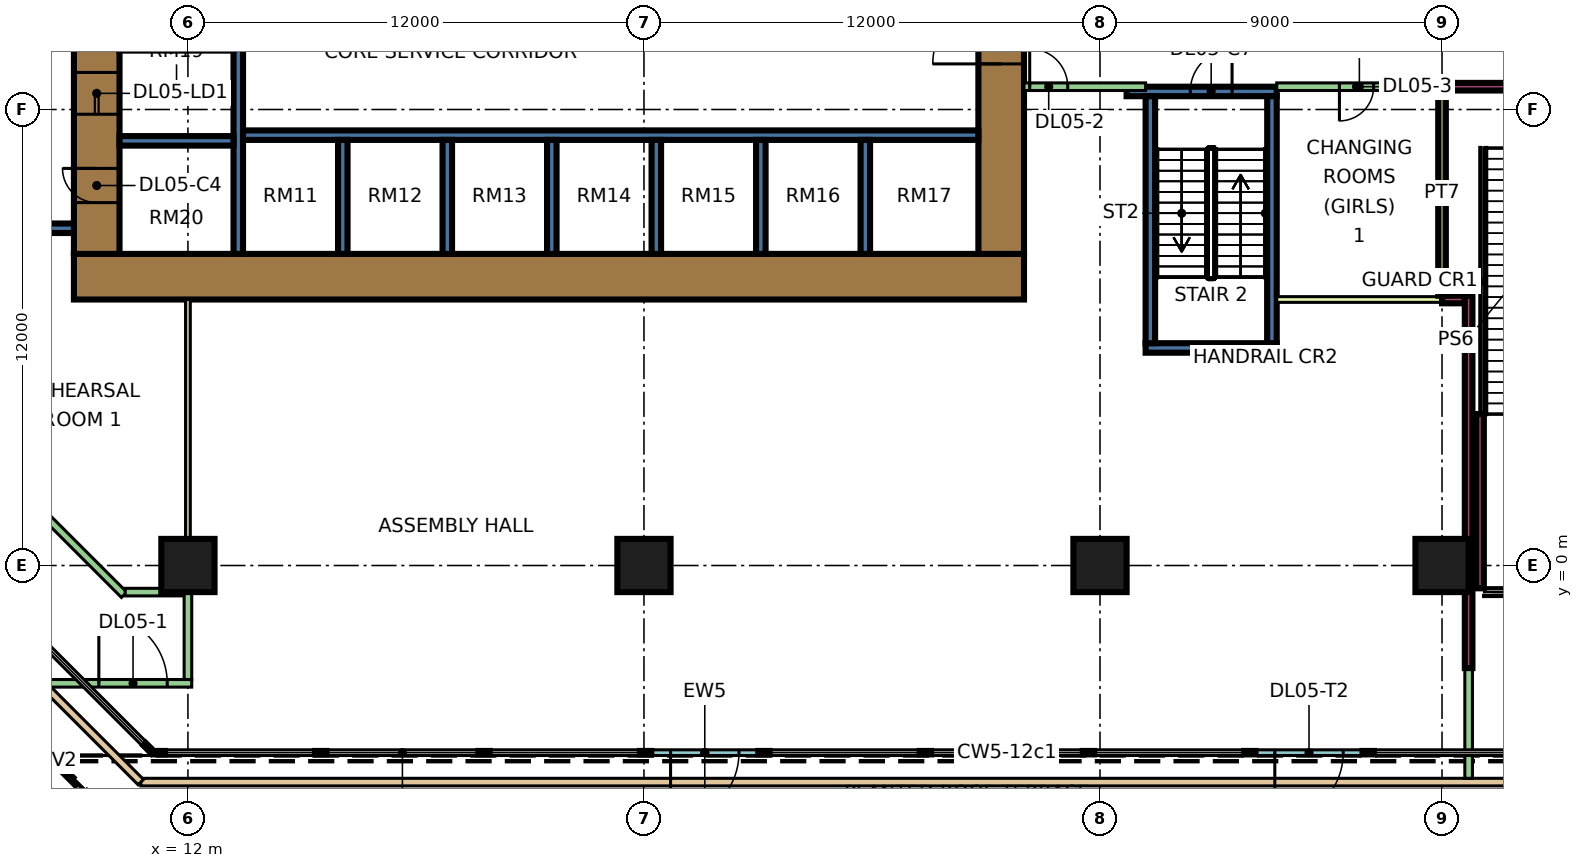
"""IFC4 building model, lengths in metres.
Left out: names, types, materials, properties, quantities, classifications, styles, units other than length and angle.
Written with IfcOpenShell. Run it as: python <this file> out.ifc"""

import sys

from ifc_helpers import new_model, si_unit, direction, frame, frame_2d, origin, origin_2d, place, context, subcontext, project, spatial, rectangle, extrude, element, fill, save


model = new_model("IFC4")
c1 = context("Model", 3, precision=1e-05, world=origin(), true_north=direction((0.0, 1.0)))
c2 = subcontext(c1, "Body", "Model", "MODEL_VIEW")
j1 = project(units=[si_unit("LENGTHUNIT", "METRE"), si_unit("PLANEANGLEUNIT", "RADIAN")], contexts=[c1])
p1 = place(None, origin())
s1 = spatial("IfcSite", under=j1, at=p1, CompositionType="ELEMENT")
p2 = place(p1, origin())
s2 = spatial("IfcBuilding", under=s1, at=p2, CompositionType="ELEMENT")
p3 = place(p2, frame((0.0, 0.0, 26.4)))
s3 = spatial("IfcBuildingStorey", under=s2, at=p3, CompositionType="ELEMENT", Elevation=26.4)
for number, where, z_axis, x_axis in (
    (1, (12.0, 0.0, 0.0), (0.0, 0.0, 1.0), (1.0, 0.0, 0.0)),
    (2, (24.0, 0.0, 0.0), (0.0, 0.0, 1.0), (1.0, 0.0, 0.0)),
    (3, (36.0, 0.0, 0.0), (0.0, 0.0, 1.0), (1.0, 0.0, 0.0)),
    (4, (45.0, 0.0, 0.0), (0.0, 0.0, 1.0), (1.0, 0.0, 0.0)),
):
    element("IfcColumn", number, at=place(p3, frame(where, z_axis=z_axis, x_axis=x_axis)), inside=s3, PredefinedType="COLUMN", context=c2, shape_type="SweptSolid", body=[
        extrude(rectangle(XDim=1.4, YDim=1.4, at=origin_2d()), origin(), (0.0, 0.0, 1.0), 9.0),
    ])
p4 = place(p3, frame((9.0, 7.6, 0.0), z_axis=(0.0, 0.0, 1.0), x_axis=(1.0, 0.0, 0.0)))
e5 = element("IfcWall", 5, at=p4, inside=s3, PredefinedType="SHEAR", context=c2, shape_type="SweptSolid", body=[
    extrude(rectangle(XDim=25.0, YDim=1.2, at=frame_2d((12.5, 0.0))), origin(), (0.0, 0.0, 1.0), 9.0),
])
p5 = place(p3, frame((9.6, 8.2, 0.0), z_axis=(0.0, 0.0, 1.0), x_axis=(0.0, 1.0, 0.0)))
e6 = element("IfcWall", 6, at=p5, inside=s3, PredefinedType="SHEAR", context=c2, shape_type="SweptSolid", body=[
    extrude(rectangle(XDim=10.6, YDim=1.2, at=frame_2d((5.3, 0.0))), origin(), (0.0, 0.0, 1.0), 9.0),
])
p6 = place(p5, frame((3.675, 0.0, 0.0)))
e7 = element("IfcOpeningElement", 7, at=p6, cuts=e6, PredefinedType="OPENING", context=c2, shape_type="SweptSolid", body=[
    extrude(rectangle(XDim=1.1, YDim=2.2, at=frame_2d((0.55, 1.1))), frame((0.0, 0.61, 0.0), z_axis=(0.0, -1.0, 0.0), x_axis=(1.0, 0.0, 0.0)), (0.0, 0.0, 1.0), 1.22),
])
p7 = place(p5, frame((6.175, 0.0, 0.0)))
e8 = element("IfcOpeningElement", 8, at=p7, cuts=e6, PredefinedType="OPENING", context=c2, shape_type="SweptSolid", body=[
    extrude(rectangle(XDim=1.1, YDim=2.2, at=frame_2d((0.55, 1.1))), frame((0.0, 0.61, 0.0), z_axis=(0.0, -1.0, 0.0), x_axis=(1.0, 0.0, 0.0)), (0.0, 0.0, 1.0), 1.22),
])
p8 = place(p5, frame((8.8, 0.0, 0.0)))
e9 = element("IfcOpeningElement", 9, at=p8, cuts=e6, PredefinedType="OPENING", context=c2, shape_type="SweptSolid", body=[
    extrude(rectangle(XDim=1.1, YDim=2.2, at=frame_2d((0.55, 1.1))), frame((0.0, 0.61, 0.0), z_axis=(0.0, -1.0, 0.0), x_axis=(1.0, 0.0, 0.0)), (0.0, 0.0, 1.0), 1.22),
])
p9 = place(p5, frame((1.35, 0.0, 0.0)))
e10 = element("IfcOpeningElement", 10, at=p9, cuts=e6, PredefinedType="OPENING", context=c2, shape_type="SweptSolid", body=[
    extrude(rectangle(XDim=0.9, YDim=2.1, at=frame_2d((0.45, 1.05))), frame((0.0, 0.61, 0.0), z_axis=(0.0, -1.0, 0.0), x_axis=(1.0, 0.0, 0.0)), (0.0, 0.0, 1.0), 1.22),
])
p10 = place(p3, frame((33.4, 8.2, 0.0), z_axis=(0.0, 0.0, 1.0), x_axis=(0.0, 1.0, 0.0)))
e11 = element("IfcWall", 11, at=p10, inside=s3, PredefinedType="SHEAR", context=c2, shape_type="SweptSolid", body=[
    extrude(rectangle(XDim=10.6, YDim=1.2, at=frame_2d((5.3, 0.0))), origin(), (0.0, 0.0, 1.0), 9.0),
])
p11 = place(p10, frame((5.0, 0.0, 0.0)))
e12 = element("IfcOpeningElement", 12, at=p11, cuts=e11, PredefinedType="OPENING", context=c2, shape_type="SweptSolid", body=[
    extrude(rectangle(XDim=1.8, YDim=2.4, at=frame_2d((0.9, 1.2))), frame((0.0, 0.61, 0.0), z_axis=(0.0, -1.0, 0.0), x_axis=(1.0, 0.0, 0.0)), (0.0, 0.0, 1.0), 1.22),
])
p12 = place(p3, frame((13.325, 8.2, 0.0), z_axis=(0.0, 0.0, 1.0), x_axis=(0.0, 1.0, 0.0)))
e13 = element("IfcWall", 13, at=p12, inside=s3, PredefinedType="SHEAR", context=c2, shape_type="SweptSolid", body=[
    extrude(rectangle(XDim=10.6, YDim=0.25, at=frame_2d((5.3, 0.0))), origin(), (0.0, 0.0, 1.0), 9.0),
])
p13 = place(p3, frame((13.45, 11.325, 0.0), z_axis=(0.0, 0.0, 1.0), x_axis=(1.0, 0.0, 0.0)))
e14 = element("IfcWall", 14, at=p13, inside=s3, PredefinedType="SHEAR", context=c2, shape_type="SweptSolid", body=[
    extrude(rectangle(XDim=19.35, YDim=0.25, at=frame_2d((9.675, 0.0))), origin(), (0.0, 0.0, 1.0), 9.0),
])
for number, where, z_axis, x_axis in (
    (15, (10.2, 11.175, 0.0), (0.0, 0.0, 1.0), (1.0, 0.0, 0.0)),
    (16, (16.075, 8.2, 0.0), (0.0, 0.0, 1.0), (0.0, 1.0, 0.0)),
    (17, (18.825, 8.2, 0.0), (0.0, 0.0, 1.0), (0.0, 1.0, 0.0)),
    (18, (21.575, 8.2, 0.0), (0.0, 0.0, 1.0), (0.0, 1.0, 0.0)),
    (19, (24.325, 8.2, 0.0), (0.0, 0.0, 1.0), (0.0, 1.0, 0.0)),
    (20, (27.075, 8.2, 0.0), (0.0, 0.0, 1.0), (0.0, 1.0, 0.0)),
    (21, (29.825, 8.2, 0.0), (0.0, 0.0, 1.0), (0.0, 1.0, 0.0)),
):
    element("IfcWall", number, at=place(p3, frame(where, z_axis=z_axis, x_axis=x_axis)), inside=s3, PredefinedType="SHEAR", context=c2, shape_type="SweptSolid", body=[
        extrude(rectangle(XDim=3.0, YDim=0.25, at=frame_2d((1.5, 0.0))), origin(), (0.0, 0.0, 1.0), 9.0),
    ])
p14 = place(p3, frame((5.3, 8.875, 0.0), z_axis=(0.0, 0.0, 1.0), x_axis=(1.0, 0.0, 0.0)))
e22 = element("IfcWall", 22, at=p14, inside=s3, PredefinedType="SHEAR", context=c2, shape_type="SweptSolid", body=[
    extrude(rectangle(XDim=3.7, YDim=0.25, at=frame_2d((1.85, 0.0))), origin(), (0.0, 0.0, 1.0), 9.0),
])
p15 = place(p3, frame((37.2, 5.725, 0.0), z_axis=(0.0, 0.0, 1.0), x_axis=(1.0, 0.0, 0.0)))
e23 = element("IfcWall", 23, at=p15, inside=s3, PredefinedType="SHEAR", context=c2, shape_type="SweptSolid", body=[
    extrude(rectangle(XDim=3.45, YDim=0.25, at=frame_2d((1.725, 0.0))), origin(), (0.0, 0.0, 1.0), 9.0),
])
p16 = place(p3, frame((36.7, 12.475, 0.0), z_axis=(0.0, 0.0, 1.0), x_axis=(1.0, 0.0, 0.0)))
e24 = element("IfcWall", 24, at=p16, inside=s3, PredefinedType="SHEAR", context=c2, shape_type="SweptSolid", body=[
    extrude(rectangle(XDim=3.95, YDim=0.25, at=frame_2d((1.975, 0.0))), origin(), (0.0, 0.0, 1.0), 9.0),
])
p17 = place(p16, frame((1.675, 0.0, 0.0)))
e25 = element("IfcOpeningElement", 25, at=p17, cuts=e24, PredefinedType="OPENING", context=c2, shape_type="SweptSolid", body=[
    extrude(rectangle(XDim=1.1, YDim=2.2, at=frame_2d((0.55, 1.1))), frame((0.0, 0.135, 0.0), z_axis=(0.0, -1.0, 0.0), x_axis=(1.0, 0.0, 0.0)), (0.0, 0.0, 1.0), 0.27),
])
for number, where, z_axis, x_axis in (
    (26, (37.325, 5.85, 0.0), (0.0, 0.0, 1.0), (0.0, 1.0, 0.0)),
    (27, (40.525, 5.85, 0.0), (0.0, 0.0, 1.0), (0.0, 1.0, 0.0)),
):
    element("IfcWall", number, at=place(p3, frame(where, z_axis=z_axis, x_axis=x_axis)), inside=s3, PredefinedType="SHEAR", context=c2, shape_type="SweptSolid", body=[
        extrude(rectangle(XDim=6.5, YDim=0.25, at=frame_2d((3.25, 0.0))), origin(), (0.0, 0.0, 1.0), 9.0),
    ])
p18 = place(p3, frame((24.1, -4.925, 0.0), z_axis=(0.0, 0.0, 1.0), x_axis=(1.0, 0.0, 0.0)))
e28 = element("IfcWall", 28, at=p18, inside=s3, PredefinedType="SOLIDWALL", context=c2, shape_type="SweptSolid", body=[
    extrude(rectangle(XDim=3.0, YDim=0.15, at=frame_2d((1.5, 0.0))), origin(), (0.0, 0.0, 1.0), 8.45),
])
p19 = place(p18, frame((0.6, 0.0, 0.0)))
e29 = element("IfcOpeningElement", 29, at=p19, cuts=e28, PredefinedType="OPENING", context=c2, shape_type="SweptSolid", body=[
    extrude(rectangle(XDim=1.8, YDim=2.4, at=frame_2d((0.9, 1.2))), frame((0.0, 0.085, 0.0), z_axis=(0.0, -1.0, 0.0), x_axis=(1.0, 0.0, 0.0)), (0.0, 0.0, 1.0), 0.17),
])
p20 = place(p3, frame((40.0, -4.925, 0.0), z_axis=(0.0, 0.0, 1.0), x_axis=(1.0, 0.0, 0.0)))
e30 = element("IfcWall", 30, at=p20, inside=s3, PredefinedType="SOLIDWALL", context=c2, shape_type="SweptSolid", body=[
    extrude(rectangle(XDim=3.0, YDim=0.15, at=frame_2d((1.5, 0.0))), origin(), (0.0, 0.0, 1.0), 8.45),
])
p21 = place(p20, frame((0.6, 0.0, 0.0)))
e31 = element("IfcOpeningElement", 31, at=p21, cuts=e30, PredefinedType="OPENING", context=c2, shape_type="SweptSolid", body=[
    extrude(rectangle(XDim=1.8, YDim=2.4, at=frame_2d((0.9, 1.2))), frame((0.0, 0.085, 0.0), z_axis=(0.0, -1.0, 0.0), x_axis=(1.0, 0.0, 0.0)), (0.0, 0.0, 1.0), 0.17),
])
p22 = place(p3, frame((72.24, -5.7, 0.0), z_axis=(0.0, 0.0, 1.0), x_axis=(-1.0, 0.0, 0.0)))
e32 = element("IfcWall", 32, at=p22, inside=s3, PredefinedType="PARAPET", context=c2, shape_type="SweptSolid", body=[
    extrude(rectangle(XDim=61.479, YDim=0.2, at=frame_2d((30.74, 0.0))), origin(), (0.0, 0.0, 1.0), 0.5),
])
p23 = place(p3, frame((10.76, -5.7, 0.0), z_axis=(0.0, 0.0, 1.0), x_axis=(-0.707106781187, 0.707106781187, 0.0)))
e33 = element("IfcWall", 33, at=p23, inside=s3, PredefinedType="PARAPET", context=c2, shape_type="SweptSolid", body=[
    extrude(rectangle(XDim=23.278, YDim=0.2, at=frame_2d((11.639, 0.0))), origin(), (0.0, 0.0, 1.0), 0.5),
])
p24 = place(p3, frame((-0.629, 10.179, 0.0), z_axis=(0.0, 0.0, 1.0), x_axis=(0.707106781187, -0.707106781187, 0.0)))
e34 = element("IfcWall", 34, at=p24, inside=s3, PredefinedType="PARTITIONING", context=c2, shape_type="SweptSolid", body=[
    extrude(rectangle(XDim=15.486, YDim=0.2, at=frame_2d((7.743, 0.0))), origin(), (0.0, 0.0, 1.0), 8.45),
])
p25 = place(p24, frame((9.235, 0.0, 0.0)))
e35 = element("IfcOpeningElement", 35, at=p25, cuts=e34, PredefinedType="OPENING", context=c2, shape_type="SweptSolid", body=[
    extrude(rectangle(XDim=1.0, YDim=2.1, at=frame_2d((0.5, 1.05))), frame((0.0, 0.11, 0.0), z_axis=(0.0, -1.0, 0.0), x_axis=(1.0, 0.0, 0.0)), (0.0, 0.0, 1.0), 0.22),
])
p26 = place(p3, frame((8.302, -3.1, 0.0), z_axis=(0.0, 0.0, 1.0), x_axis=(1.0, 0.0, 0.0)))
e36 = element("IfcWall", 36, at=p26, inside=s3, PredefinedType="PARTITIONING", context=c2, shape_type="SweptSolid", body=[
    extrude(rectangle(XDim=3.798, YDim=0.2, at=frame_2d((1.899, 0.0))), origin(), (0.0, 0.0, 1.0), 8.45),
])
p27 = place(p26, frame((1.354, 0.0, 0.0)))
e37 = element("IfcOpeningElement", 37, at=p27, cuts=e36, PredefinedType="OPENING", context=c2, shape_type="SweptSolid", body=[
    extrude(rectangle(XDim=1.8, YDim=2.1, at=frame_2d((0.9, 1.05))), frame((0.0, 0.11, 0.0), z_axis=(0.0, -1.0, 0.0), x_axis=(1.0, 0.0, 0.0)), (0.0, 0.0, 1.0), 0.22),
])
p28 = place(p3, frame((10.35, -0.7, 0.0), z_axis=(0.0, 0.0, 1.0), x_axis=(1.0, 0.0, 0.0)))
e38 = element("IfcWall", 38, at=p28, inside=s3, PredefinedType="PARTITIONING", context=c2, shape_type="SweptSolid", body=[
    extrude(rectangle(XDim=1.55, YDim=0.2, at=frame_2d((0.775, 0.0))), origin(), (0.0, 0.0, 1.0), 8.45),
])
p29 = place(p3, frame((12.0, -3.0, 0.0), z_axis=(0.0, 0.0, 1.0), x_axis=(0.0, 1.0, 0.0)))
e39 = element("IfcWall", 39, at=p29, inside=s3, PredefinedType="PARTITIONING", context=c2, shape_type="SweptSolid", body=[
    extrude(rectangle(XDim=2.3, YDim=0.2, at=frame_2d((1.15, 0.0))), origin(), (0.0, 0.0, 1.0), 8.45),
])
p30 = place(p3, frame((12.0, -0.7, 0.0), z_axis=(0.0, 0.0, 1.0), x_axis=(0.0, 1.0, 0.0)))
e40 = element("IfcWall", 40, at=p30, inside=s3, PredefinedType="PARTITIONING", context=c2, shape_type="SweptSolid", body=[
    extrude(rectangle(XDim=7.7, YDim=0.125, at=frame_2d((3.85, 0.0))), origin(), (0.0, 0.0, 1.0), 8.45),
])
p31 = place(p3, frame((34.0, 12.6, 0.0), z_axis=(0.0, 0.0, 1.0), x_axis=(1.0, 0.0, 0.0)))
e41 = element("IfcWall", 41, at=p31, inside=s3, PredefinedType="PARTITIONING", context=c2, shape_type="SweptSolid", body=[
    extrude(rectangle(XDim=3.2, YDim=0.2, at=frame_2d((1.6, 0.0))), origin(), (0.0, 0.0, 1.0), 8.45),
])
p32 = place(p31, frame((0.15, 0.0, 0.0)))
e42 = element("IfcOpeningElement", 42, at=p32, cuts=e41, PredefinedType="OPENING", context=c2, shape_type="SweptSolid", body=[
    extrude(rectangle(XDim=1.0, YDim=2.1, at=frame_2d((0.5, 1.05))), frame((0.0, 0.11, 0.0), z_axis=(0.0, -1.0, 0.0), x_axis=(1.0, 0.0, 0.0)), (0.0, 0.0, 1.0), 0.22),
])
p33 = place(p3, frame((40.65, 7.0, 0.0), z_axis=(0.0, 0.0, 1.0), x_axis=(1.0, 0.0, 0.0)))
e43 = element("IfcWall", 43, at=p33, inside=s3, PredefinedType="PARTITIONING", context=c2, shape_type="SweptSolid", body=[
    extrude(rectangle(XDim=4.35, YDim=0.15, at=frame_2d((2.175, 0.0))), origin(), (0.0, 0.0, 1.0), 8.45),
])
p34 = place(p3, frame((40.65, 12.6, 0.0), z_axis=(0.0, 0.0, 1.0), x_axis=(1.0, 0.0, 0.0)))
e44 = element("IfcWall", 44, at=p34, inside=s3, PredefinedType="PARTITIONING", context=c2, shape_type="SweptSolid", body=[
    extrude(rectangle(XDim=4.35, YDim=0.2, at=frame_2d((2.175, 0.0))), origin(), (0.0, 0.0, 1.0), 8.45),
])
p35 = place(p34, frame((1.65, 0.0, 0.0)))
e45 = element("IfcOpeningElement", 45, at=p35, cuts=e44, PredefinedType="OPENING", context=c2, shape_type="SweptSolid", body=[
    extrude(rectangle(XDim=0.9, YDim=2.1, at=frame_2d((0.45, 1.05))), frame((0.0, 0.11, 0.0), z_axis=(0.0, -1.0, 0.0), x_axis=(1.0, 0.0, 0.0)), (0.0, 0.0, 1.0), 0.22),
])
p36 = place(p3, frame((45.0, 7.0, 0.0), z_axis=(0.0, 0.0, 1.0), x_axis=(1.0, 0.0, 0.0)))
e46 = element("IfcWall", 46, at=p36, inside=s3, PredefinedType="SOLIDWALL", context=c2, shape_type="SweptSolid", body=[
    extrude(rectangle(XDim=0.6, YDim=0.2, at=frame_2d((0.3, 0.0))), origin(), (0.0, 0.0, 1.0), 8.45),
])
p37 = place(p3, frame((45.0, 7.1, 0.0), z_axis=(0.0, 0.0, 1.0), x_axis=(0.0, 1.0, 0.0)))
e47 = element("IfcWall", 47, at=p37, inside=s3, PredefinedType="SOLIDWALL", context=c2, shape_type="SweptSolid", body=[
    extrude(rectangle(XDim=5.4, YDim=0.2, at=frame_2d((2.7, 0.0))), origin(), (0.0, 0.0, 1.0), 6.55),
])
p38 = place(p3, frame((45.0, 12.6, 0.0), z_axis=(0.0, 0.0, 1.0), x_axis=(1.0, 0.0, 0.0)))
e48 = element("IfcWall", 48, at=p38, inside=s3, PredefinedType="SOLIDWALL", context=c2, shape_type="SweptSolid", body=[
    extrude(rectangle(XDim=8.9, YDim=0.2, at=frame_2d((4.45, 0.0))), origin(), (0.0, 0.0, 1.0), 8.45),
])
p39 = place(p38, frame((5.75, 0.0, 0.0)))
e49 = element("IfcOpeningElement", 49, at=p39, cuts=e48, PredefinedType="OPENING", context=c2, shape_type="SweptSolid", body=[
    extrude(rectangle(XDim=1.2, YDim=2.1, at=frame_2d((0.6, 1.05))), frame((0.0, 0.11, 0.0), z_axis=(0.0, -1.0, 0.0), x_axis=(1.0, 0.0, 0.0)), (0.0, 0.0, 1.0), 0.22),
])
p40 = place(p38, frame((2.15, 0.0, 0.0)))
e50 = element("IfcOpeningElement", 50, at=p40, cuts=e48, PredefinedType="OPENING", context=c2, shape_type="SweptSolid", body=[
    extrude(rectangle(XDim=1.2, YDim=2.1, at=frame_2d((0.6, 1.05))), frame((0.0, 0.11, 0.0), z_axis=(0.0, -1.0, 0.0), x_axis=(1.0, 0.0, 0.0)), (0.0, 0.0, 1.0), 0.22),
])
p41 = place(p3, frame((45.7, -5.6, 0.0), z_axis=(0.0, 0.0, 1.0), x_axis=(0.0, 1.0, 0.0)))
e51 = element("IfcWall", 51, at=p41, inside=s3, PredefinedType="PARTITIONING", context=c2, shape_type="SweptSolid", body=[
    extrude(rectangle(XDim=2.9, YDim=0.2, at=frame_2d((1.45, 0.0))), origin(), (0.0, 0.0, 1.0), 8.45),
])
p42 = place(p3, frame((45.7, -2.7, 0.0), z_axis=(0.0, 0.0, 1.0), x_axis=(0.0, 1.0, 0.0)))
e52 = element("IfcWall", 52, at=p42, inside=s3, PredefinedType="SOLIDWALL", context=c2, shape_type="SweptSolid", body=[
    extrude(rectangle(XDim=9.8, YDim=0.2, at=frame_2d((4.9, 0.0))), origin(), (0.0, 0.0, 1.0), 8.45),
])
p43 = place(p3, frame((46.0, -0.6, 0.0), z_axis=(0.0, 0.0, 1.0), x_axis=(0.0, 1.0, 0.0)))
e53 = element("IfcWall", 53, at=p43, inside=s3, PredefinedType="SOLIDWALL", context=c2, shape_type="SweptSolid", body=[
    extrude(rectangle(XDim=4.585, YDim=0.2, at=frame_2d((2.292, 0.0))), origin(), (0.0, 0.0, 1.0), 8.45),
])
p44 = place(p19, frame((1.8, 0.0, 0.0), z_axis=(0.0, 0.0, 1.0), x_axis=(-1.0, 0.0, 0.0)))
e54 = element("IfcDoor", 54, at=p44, inside=s3, OperationType="DOUBLE_DOOR_SINGLE_SWING", PredefinedType="DOOR", context=c2, shape_type="SweptSolid", body=[
    extrude(rectangle(XDim=1.8, YDim=2.4, at=frame_2d((0.9, 1.2))), frame((0.0, 0.025, 0.0), z_axis=(0.0, -1.0, 0.0), x_axis=(1.0, 0.0, 0.0)), (0.0, 0.0, 1.0), 0.05),
])
fill(e29, e54)
p45 = place(p21, frame((1.8, 0.0, 0.0), z_axis=(0.0, 0.0, 1.0), x_axis=(-1.0, 0.0, 0.0)))
e55 = element("IfcDoor", 55, at=p45, inside=s3, OperationType="DOUBLE_DOOR_SINGLE_SWING", PredefinedType="DOOR", context=c2, shape_type="SweptSolid", body=[
    extrude(rectangle(XDim=1.8, YDim=2.4, at=frame_2d((0.9, 1.2))), frame((0.0, 0.025, 0.0), z_axis=(0.0, -1.0, 0.0), x_axis=(1.0, 0.0, 0.0)), (0.0, 0.0, 1.0), 0.05),
])
fill(e31, e55)
p46 = place(p6, origin())
e56 = element("IfcDoor", 56, at=p46, inside=s3, OperationType="DOUBLE_DOOR_SLIDING", PredefinedType="DOOR", context=c2, shape_type="SweptSolid", body=[
    extrude(rectangle(XDim=1.1, YDim=2.2, at=frame_2d((0.55, 1.1))), frame((0.0, 0.025, 0.0), z_axis=(0.0, -1.0, 0.0), x_axis=(1.0, 0.0, 0.0)), (0.0, 0.0, 1.0), 0.05),
])
fill(e7, e56)
p47 = place(p11, origin())
e57 = element("IfcDoor", 57, at=p47, inside=s3, OperationType="DOUBLE_DOOR_SINGLE_SWING", PredefinedType="DOOR", context=c2, shape_type="SweptSolid", body=[
    extrude(rectangle(XDim=1.8, YDim=2.4, at=frame_2d((0.9, 1.2))), frame((0.0, 0.025, 0.0), z_axis=(0.0, -1.0, 0.0), x_axis=(1.0, 0.0, 0.0)), (0.0, 0.0, 1.0), 0.05),
])
fill(e12, e57)
p48 = place(p9, frame((0.9, 0.0, 0.0), z_axis=(0.0, 0.0, 1.0), x_axis=(-1.0, 0.0, 0.0)))
e58 = element("IfcDoor", 58, at=p48, inside=s3, OperationType="SINGLE_SWING_RIGHT", PredefinedType="DOOR", context=c2, shape_type="SweptSolid", body=[
    extrude(rectangle(XDim=0.9, YDim=2.1, at=frame_2d((0.45, 1.05))), frame((0.0, 0.025, 0.0), z_axis=(0.0, -1.0, 0.0), x_axis=(1.0, 0.0, 0.0)), (0.0, 0.0, 1.0), 0.05),
])
fill(e10, e58)
p49 = place(p17, frame((1.1, 0.0, 0.0), z_axis=(0.0, 0.0, 1.0), x_axis=(-1.0, 0.0, 0.0)))
e59 = element("IfcDoor", 59, at=p49, inside=s3, OperationType="SINGLE_SWING_RIGHT", PredefinedType="DOOR", context=c2, shape_type="SweptSolid", body=[
    extrude(rectangle(XDim=1.1, YDim=2.2, at=frame_2d((0.55, 1.1))), frame((0.0, 0.025, 0.0), z_axis=(0.0, -1.0, 0.0), x_axis=(1.0, 0.0, 0.0)), (0.0, 0.0, 1.0), 0.05),
])
fill(e25, e59)
p50 = place(p27, origin())
e60 = element("IfcDoor", 60, at=p50, inside=s3, OperationType="DOUBLE_DOOR_SINGLE_SWING", PredefinedType="DOOR", context=c2, shape_type="SweptSolid", body=[
    extrude(rectangle(XDim=1.8, YDim=2.1, at=frame_2d((0.9, 1.05))), frame((0.0, 0.025, 0.0), z_axis=(0.0, -1.0, 0.0), x_axis=(1.0, 0.0, 0.0)), (0.0, 0.0, 1.0), 0.05),
])
fill(e37, e60)
p51 = place(p32, origin())
e61 = element("IfcDoor", 61, at=p51, inside=s3, OperationType="SINGLE_SWING_LEFT", PredefinedType="DOOR", context=c2, shape_type="SweptSolid", body=[
    extrude(rectangle(XDim=1.0, YDim=2.1, at=frame_2d((0.5, 1.05))), frame((0.0, 0.025, 0.0), z_axis=(0.0, -1.0, 0.0), x_axis=(1.0, 0.0, 0.0)), (0.0, 0.0, 1.0), 0.05),
])
fill(e42, e61)
p52 = place(p35, frame((0.9, 0.0, 0.0), z_axis=(0.0, 0.0, 1.0), x_axis=(-1.0, 0.0, 0.0)))
e62 = element("IfcDoor", 62, at=p52, inside=s3, OperationType="SINGLE_SWING_LEFT", PredefinedType="DOOR", context=c2, shape_type="SweptSolid", body=[
    extrude(rectangle(XDim=0.9, YDim=2.1, at=frame_2d((0.45, 1.05))), frame((0.0, 0.025, 0.0), z_axis=(0.0, -1.0, 0.0), x_axis=(1.0, 0.0, 0.0)), (0.0, 0.0, 1.0), 0.05),
])
fill(e45, e62)
save(model, sys.argv[1])
